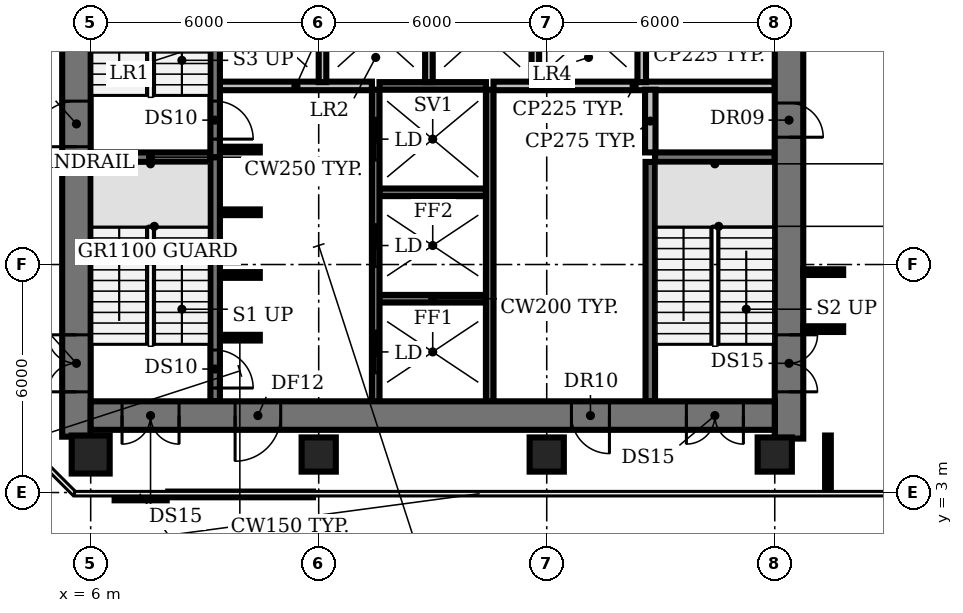
"""IFC4 building model, lengths in metres.
Left out: names, types, materials, properties, quantities, classifications, styles, units other than length and angle.
Written with IfcOpenShell. Run it as: python <this file> out.ifc"""

import sys

from ifc_helpers import new_model, si_unit, direction, frame, frame_2d, origin, origin_2d, place, context, subcontext, project, spatial, rectangle, circle, extrude, element, fill, save


model = new_model("IFC4")
c1 = context("Model", 3, precision=1e-05, world=origin(), true_north=direction((0.0, 1.0)))
c2 = subcontext(c1, "Body", "Model", "MODEL_VIEW")
j1 = project(units=[si_unit("LENGTHUNIT", "METRE"), si_unit("PLANEANGLEUNIT", "RADIAN")], contexts=[c1])
p1 = place(None, origin())
s1 = spatial("IfcSite", under=j1, at=p1, CompositionType="ELEMENT")
p2 = place(p1, origin())
s2 = spatial("IfcBuilding", under=s1, at=p2, CompositionType="ELEMENT")
p3 = place(p2, frame((0.0, 0.0, 92.0)))
s3 = spatial("IfcBuildingStorey", under=s2, at=p3, CompositionType="ELEMENT", Elevation=92.0)
p4 = place(p3, frame((6.0, 4.0, 0.0), z_axis=(0.0, 0.0, 1.0), x_axis=(1.0, 0.0, 0.0)))
e1 = element("IfcColumn", 1, at=p4, inside=s3, PredefinedType="COLUMN", context=c2, shape_type="SweptSolid", body=[
    extrude(circle(Radius=0.5, at=origin_2d()), origin(), (0.0, 0.0, 1.0), 3.85),
])
for number, where, z_axis, x_axis in (
    (2, (12.0, 4.0, 0.0), (0.0, 0.0, 1.0), (1.0, 0.0, 0.0)),
    (3, (18.0, 4.0, 0.0), (0.0, 0.0, 1.0), (1.0, 0.0, 0.0)),
    (4, (24.0, 4.0, 0.0), (0.0, 0.0, 1.0), (1.0, 0.0, 0.0)),
):
    element("IfcColumn", number, at=place(p3, frame(where, z_axis=z_axis, x_axis=x_axis)), inside=s3, PredefinedType="COLUMN", context=c2, shape_type="SweptSolid", body=[
        extrude(rectangle(XDim=0.9, YDim=0.9, at=origin_2d()), origin(), (0.0, 0.0, 1.0), 3.85),
    ])
p5 = place(p3, frame((9.4, 7.075, 0.0), z_axis=(0.0, 0.0, 1.0), x_axis=(1.0, 0.0, 0.0)))
e5 = element("IfcWall", 5, at=p5, inside=s3, PredefinedType="SHEAR", context=c2, shape_type="SweptSolid", body=[
    extrude(rectangle(XDim=1.05, YDim=0.15, at=frame_2d((0.525, 0.0))), origin(), (0.0, 0.0, 1.0), 3.85),
])
p6 = place(p3, frame((13.6, 8.1, 0.0), z_axis=(0.0, 0.0, 1.0), x_axis=(1.0, 0.0, 0.0)))
e6 = element("IfcWall", 6, at=p6, inside=s3, PredefinedType="SHEAR", context=c2, shape_type="SweptSolid", body=[
    extrude(rectangle(XDim=2.8, YDim=0.2, at=frame_2d((1.4, 0.0))), origin(), (0.0, 0.0, 1.0), 3.85),
])
for number, where, z_axis, x_axis in (
    (7, (9.4, 8.725, 0.0), (0.0, 0.0, 1.0), (1.0, 0.0, 0.0)),
    (8, (9.4, 10.375, 0.0), (0.0, 0.0, 1.0), (1.0, 0.0, 0.0)),
):
    element("IfcWall", number, at=place(p3, frame(where, z_axis=z_axis, x_axis=x_axis)), inside=s3, PredefinedType="SHEAR", context=c2, shape_type="SweptSolid", body=[
        extrude(rectangle(XDim=1.05, YDim=0.15, at=frame_2d((0.525, 0.0))), origin(), (0.0, 0.0, 1.0), 3.85),
    ])
p7 = place(p3, frame((13.6, 10.9, 0.0), z_axis=(0.0, 0.0, 1.0), x_axis=(1.0, 0.0, 0.0)))
e9 = element("IfcWall", 9, at=p7, inside=s3, PredefinedType="SHEAR", context=c2, shape_type="SweptSolid", body=[
    extrude(rectangle(XDim=2.8, YDim=0.2, at=frame_2d((1.4, 0.0))), origin(), (0.0, 0.0, 1.0), 3.85),
])
for number, where, z_axis, x_axis in (
    (10, (6.0, 11.825, 0.0), (0.0, 0.0, 1.0), (1.0, 0.0, 0.0)),
    (11, (20.85, 11.825, 0.0), (0.0, 0.0, 1.0), (1.0, 0.0, 0.0)),
):
    element("IfcWall", number, at=place(p3, frame(where, z_axis=z_axis, x_axis=x_axis)), inside=s3, PredefinedType="SHEAR", context=c2, shape_type="SweptSolid", body=[
        extrude(rectangle(XDim=3.15, YDim=0.25, at=frame_2d((1.575, 0.0))), origin(), (0.0, 0.0, 1.0), 3.85),
    ])
p8 = place(p3, frame((9.4, 12.025, 0.0), z_axis=(0.0, 0.0, 1.0), x_axis=(1.0, 0.0, 0.0)))
e12 = element("IfcWall", 12, at=p8, inside=s3, PredefinedType="SHEAR", context=c2, shape_type="SweptSolid", body=[
    extrude(rectangle(XDim=1.05, YDim=0.15, at=frame_2d((0.525, 0.0))), origin(), (0.0, 0.0, 1.0), 3.85),
])
p9 = place(p3, frame((9.4, 13.7, 0.0), z_axis=(0.0, 0.0, 1.0), x_axis=(1.0, 0.0, 0.0)))
e13 = element("IfcWall", 13, at=p9, inside=s3, PredefinedType="PARTITIONING", context=c2, shape_type="SweptSolid", body=[
    extrude(rectangle(XDim=4.0, YDim=0.225, at=frame_2d((2.0, 0.0))), origin(), (0.0, 0.0, 1.0), 3.85),
])
p10 = place(p3, frame((13.6, 13.7, 0.0), z_axis=(0.0, 0.0, 1.0), x_axis=(1.0, 0.0, 0.0)))
e14 = element("IfcWall", 14, at=p10, inside=s3, PredefinedType="SHEAR", context=c2, shape_type="SweptSolid", body=[
    extrude(rectangle(XDim=2.8, YDim=0.2, at=frame_2d((1.4, 0.0))), origin(), (0.0, 0.0, 1.0), 3.85),
])
p11 = place(p3, frame((16.6, 13.7, 0.0), z_axis=(0.0, 0.0, 1.0), x_axis=(1.0, 0.0, 0.0)))
e15 = element("IfcWall", 15, at=p11, inside=s3, PredefinedType="PARTITIONING", context=c2, shape_type="SweptSolid", body=[
    extrude(rectangle(XDim=7.4, YDim=0.225, at=frame_2d((3.7, 0.0))), origin(), (0.0, 0.0, 1.0), 3.85),
])
p12 = place(p3, frame((9.275, 11.825, 0.0), z_axis=(0.0, 0.0, 1.0), x_axis=(0.0, -1.0, 0.0)))
e16 = element("IfcWall", 16, at=p12, inside=s3, PredefinedType="SHEAR", context=c2, shape_type="SweptSolid", body=[
    extrude(rectangle(XDim=6.425, YDim=0.25, at=frame_2d((3.212, 0.0))), origin(), (0.0, 0.0, 1.0), 3.85),
])
p13 = place(p12, frame((5.075, 0.0, 0.0)))
e17 = element("IfcOpeningElement", 17, at=p13, cuts=e16, PredefinedType="OPENING", context=c2, shape_type="SweptSolid", body=[
    extrude(rectangle(XDim=1.0, YDim=2.1, at=frame_2d((0.5, 1.05))), frame((0.0, 0.135, 0.0), z_axis=(0.0, -1.0, 0.0), x_axis=(1.0, 0.0, 0.0)), (0.0, 0.0, 1.0), 0.27),
])
p14 = place(p3, frame((9.275, 18.375, 0.0), z_axis=(0.0, 0.0, 1.0), x_axis=(0.0, -1.0, 0.0)))
e18 = element("IfcWall", 18, at=p14, inside=s3, PredefinedType="SHEAR", context=c2, shape_type="SweptSolid", body=[
    extrude(rectangle(XDim=6.55, YDim=0.25, at=frame_2d((3.275, 0.0))), origin(), (0.0, 0.0, 1.0), 3.85),
])
p15 = place(p14, frame((5.075, 0.0, 0.0)))
e19 = element("IfcOpeningElement", 19, at=p15, cuts=e18, PredefinedType="OPENING", context=c2, shape_type="SweptSolid", body=[
    extrude(rectangle(XDim=1.0, YDim=2.1, at=frame_2d((0.5, 1.05))), frame((0.0, 0.135, 0.0), z_axis=(0.0, -1.0, 0.0), x_axis=(1.0, 0.0, 0.0)), (0.0, 0.0, 1.0), 0.27),
])
p16 = place(p3, frame((12.1, 13.8, 0.0), z_axis=(0.0, 0.0, 1.0), x_axis=(0.0, 1.0, 0.0)))
e20 = element("IfcWall", 20, at=p16, inside=s3, PredefinedType="SOLIDWALL", context=c2, shape_type="SweptSolid", body=[
    extrude(rectangle(XDim=2.6, YDim=0.2, at=frame_2d((1.3, 0.0))), origin(), (0.0, 0.0, 1.0), 3.85),
])
p17 = place(p3, frame((13.5, 5.4, 0.0), z_axis=(0.0, 0.0, 1.0), x_axis=(0.0, 1.0, 0.0)))
e21 = element("IfcWall", 21, at=p17, inside=s3, PredefinedType="SHEAR", context=c2, shape_type="SweptSolid", body=[
    extrude(rectangle(XDim=8.2, YDim=0.2, at=frame_2d((4.1, 0.0))), origin(), (0.0, 0.0, 1.0), 3.85),
])
p18 = place(p17, frame((0.75, 0.0, 0.0)))
e22 = element("IfcOpeningElement", 22, at=p18, cuts=e21, PredefinedType="OPENING", context=c2, shape_type="SweptSolid", body=[
    extrude(rectangle(XDim=1.1, YDim=2.1, at=frame_2d((0.55, 1.05))), frame((0.0, 0.11, 0.0), z_axis=(0.0, -1.0, 0.0), x_axis=(1.0, 0.0, 0.0)), (0.0, 0.0, 1.0), 0.22),
])
p19 = place(p17, frame((3.55, 0.0, 0.0)))
e23 = element("IfcOpeningElement", 23, at=p19, cuts=e21, PredefinedType="OPENING", context=c2, shape_type="SweptSolid", body=[
    extrude(rectangle(XDim=1.1, YDim=2.1, at=frame_2d((0.55, 1.05))), frame((0.0, 0.11, 0.0), z_axis=(0.0, -1.0, 0.0), x_axis=(1.0, 0.0, 0.0)), (0.0, 0.0, 1.0), 0.22),
])
p20 = place(p17, frame((6.35, 0.0, 0.0)))
e24 = element("IfcOpeningElement", 24, at=p20, cuts=e21, PredefinedType="OPENING", context=c2, shape_type="SweptSolid", body=[
    extrude(rectangle(XDim=1.1, YDim=2.1, at=frame_2d((0.55, 1.05))), frame((0.0, 0.11, 0.0), z_axis=(0.0, -1.0, 0.0), x_axis=(1.0, 0.0, 0.0)), (0.0, 0.0, 1.0), 0.22),
])
p21 = place(p3, frame((14.9, 13.8, 0.0), z_axis=(0.0, 0.0, 1.0), x_axis=(0.0, 1.0, 0.0)))
e25 = element("IfcWall", 25, at=p21, inside=s3, PredefinedType="SOLIDWALL", context=c2, shape_type="SweptSolid", body=[
    extrude(rectangle(XDim=2.6, YDim=0.2, at=frame_2d((1.3, 0.0))), origin(), (0.0, 0.0, 1.0), 3.85),
])
p22 = place(p3, frame((16.5, 5.4, 0.0), z_axis=(0.0, 0.0, 1.0), x_axis=(0.0, 1.0, 0.0)))
e26 = element("IfcWall", 26, at=p22, inside=s3, PredefinedType="SHEAR", context=c2, shape_type="SweptSolid", body=[
    extrude(rectangle(XDim=8.2, YDim=0.2, at=frame_2d((4.1, 0.0))), origin(), (0.0, 0.0, 1.0), 3.85),
])
p23 = place(p3, frame((17.7, 13.8, 0.0), z_axis=(0.0, 0.0, 1.0), x_axis=(0.0, 1.0, 0.0)))
e27 = element("IfcWall", 27, at=p23, inside=s3, PredefinedType="SOLIDWALL", context=c2, shape_type="SweptSolid", body=[
    extrude(rectangle(XDim=2.6, YDim=0.2, at=frame_2d((1.3, 0.0))), origin(), (0.0, 0.0, 1.0), 3.85),
])
p24 = place(p3, frame((20.5, 13.8, 0.0), z_axis=(0.0, 0.0, 1.0), x_axis=(0.0, 1.0, 0.0)))
e28 = element("IfcWall", 28, at=p24, inside=s3, PredefinedType="PARTITIONING", context=c2, shape_type="SweptSolid", body=[
    extrude(rectangle(XDim=2.6, YDim=0.225, at=frame_2d((1.3, 0.0))), origin(), (0.0, 0.0, 1.0), 3.85),
])
p25 = place(p3, frame((20.725, 5.4, 0.0), z_axis=(0.0, 0.0, 1.0), x_axis=(0.0, 1.0, 0.0)))
e29 = element("IfcWall", 29, at=p25, inside=s3, PredefinedType="SHEAR", context=c2, shape_type="SweptSolid", body=[
    extrude(rectangle(XDim=6.3, YDim=0.25, at=frame_2d((3.15, 0.0))), origin(), (0.0, 0.0, 1.0), 3.85),
])
p26 = place(p3, frame((20.725, 11.95, 0.0), z_axis=(0.0, 0.0, 1.0), x_axis=(0.0, 1.0, 0.0)))
e30 = element("IfcWall", 30, at=p26, inside=s3, PredefinedType="PARTITIONING", context=c2, shape_type="SweptSolid", body=[
    extrude(rectangle(XDim=1.65, YDim=0.275, at=frame_2d((0.825, 0.0))), origin(), (0.0, 0.0, 1.0), 3.85),
])
p27 = place(p3, frame((5.625, 4.47, 0.0), z_axis=(0.0, 0.0, 1.0), x_axis=(0.0, 1.0, 0.0)))
e31 = element("IfcWall", 31, at=p27, inside=s3, PredefinedType="SHEAR", context=c2, shape_type="SweptSolid", body=[
    extrude(rectangle(XDim=21.08, YDim=0.75, at=frame_2d((10.54, 0.0))), origin(), (0.0, 0.0, 1.0), 3.85),
])
p28 = place(p27, frame((1.18, 0.0, 0.0)))
e32 = element("IfcOpeningElement", 32, at=p28, cuts=e31, PredefinedType="OPENING", context=c2, shape_type="SweptSolid", body=[
    extrude(rectangle(XDim=1.5, YDim=2.1, at=frame_2d((0.75, 1.05))), frame((0.0, 0.385, 0.0), z_axis=(0.0, -1.0, 0.0), x_axis=(1.0, 0.0, 0.0)), (0.0, 0.0, 1.0), 0.77),
])
p29 = place(p27, frame((7.63, 0.0, 0.0)))
e33 = element("IfcOpeningElement", 33, at=p29, cuts=e31, PredefinedType="OPENING", context=c2, shape_type="SweptSolid", body=[
    extrude(rectangle(XDim=1.2, YDim=2.1, at=frame_2d((0.6, 1.05))), frame((0.0, 0.385, 0.0), z_axis=(0.0, -1.0, 0.0), x_axis=(1.0, 0.0, 0.0)), (0.0, 0.0, 1.0), 0.77),
])
p30 = place(p27, frame((14.18, 0.0, 0.0)))
e34 = element("IfcOpeningElement", 34, at=p30, cuts=e31, PredefinedType="OPENING", context=c2, shape_type="SweptSolid", body=[
    extrude(rectangle(XDim=1.2, YDim=2.1, at=frame_2d((0.6, 1.05))), frame((0.0, 0.385, 0.0), z_axis=(0.0, -1.0, 0.0), x_axis=(1.0, 0.0, 0.0)), (0.0, 0.0, 1.0), 0.77),
])
p31 = place(p3, frame((24.375, 25.55, 0.0), z_axis=(0.0, 0.0, 1.0), x_axis=(0.0, -1.0, 0.0)))
e35 = element("IfcWall", 35, at=p31, inside=s3, PredefinedType="SHEAR", context=c2, shape_type="SweptSolid", body=[
    extrude(rectangle(XDim=21.13, YDim=0.75, at=frame_2d((10.565, 0.0))), origin(), (0.0, 0.0, 1.0), 3.85),
])
p32 = place(p31, frame((18.4, 0.0, 0.0)))
e36 = element("IfcOpeningElement", 36, at=p32, cuts=e35, PredefinedType="OPENING", context=c2, shape_type="SweptSolid", body=[
    extrude(rectangle(XDim=1.5, YDim=2.1, at=frame_2d((0.75, 1.05))), frame((0.0, 0.385, 0.0), z_axis=(0.0, -1.0, 0.0), x_axis=(1.0, 0.0, 0.0)), (0.0, 0.0, 1.0), 0.77),
])
p33 = place(p31, frame((12.3, 0.0, 0.0)))
e37 = element("IfcOpeningElement", 37, at=p33, cuts=e35, PredefinedType="OPENING", context=c2, shape_type="SweptSolid", body=[
    extrude(rectangle(XDim=0.9, YDim=2.1, at=frame_2d((0.45, 1.05))), frame((0.0, 0.385, 0.0), z_axis=(0.0, -1.0, 0.0), x_axis=(1.0, 0.0, 0.0)), (0.0, 0.0, 1.0), 0.77),
])
p34 = place(p31, frame((6.3, 0.0, 0.0)))
e38 = element("IfcOpeningElement", 38, at=p34, cuts=e35, PredefinedType="OPENING", context=c2, shape_type="SweptSolid", body=[
    extrude(rectangle(XDim=2.0, YDim=2.1, at=frame_2d((1.0, 1.05))), frame((0.0, 0.385, 0.0), z_axis=(0.0, -1.0, 0.0), x_axis=(1.0, 0.0, 0.0)), (0.0, 0.0, 1.0), 0.77),
])
p35 = place(p3, frame((24.0, 5.025, 0.0), z_axis=(0.0, 0.0, 1.0), x_axis=(-1.0, 0.0, 0.0)))
e39 = element("IfcWall", 39, at=p35, inside=s3, PredefinedType="SHEAR", context=c2, shape_type="SweptSolid", body=[
    extrude(rectangle(XDim=18.0, YDim=0.75, at=frame_2d((9.0, 0.0))), origin(), (0.0, 0.0, 1.0), 3.85),
])
p36 = place(p35, frame((0.825, 0.0, 0.0)))
e40 = element("IfcOpeningElement", 40, at=p36, cuts=e39, PredefinedType="OPENING", context=c2, shape_type="SweptSolid", body=[
    extrude(rectangle(XDim=1.5, YDim=2.1, at=frame_2d((0.75, 1.05))), frame((0.0, 0.385, 0.0), z_axis=(0.0, -1.0, 0.0), x_axis=(1.0, 0.0, 0.0)), (0.0, 0.0, 1.0), 0.77),
])
p37 = place(p35, frame((15.675, 0.0, 0.0)))
e41 = element("IfcOpeningElement", 41, at=p37, cuts=e39, PredefinedType="OPENING", context=c2, shape_type="SweptSolid", body=[
    extrude(rectangle(XDim=1.5, YDim=2.1, at=frame_2d((0.75, 1.05))), frame((0.0, 0.385, 0.0), z_axis=(0.0, -1.0, 0.0), x_axis=(1.0, 0.0, 0.0)), (0.0, 0.0, 1.0), 0.77),
])
p38 = place(p35, frame((13.0, 0.0, 0.0)))
e42 = element("IfcOpeningElement", 42, at=p38, cuts=e39, PredefinedType="OPENING", context=c2, shape_type="SweptSolid", body=[
    extrude(rectangle(XDim=1.2, YDim=2.1, at=frame_2d((0.6, 1.05))), frame((0.0, 0.385, 0.0), z_axis=(0.0, -1.0, 0.0), x_axis=(1.0, 0.0, 0.0)), (0.0, 0.0, 1.0), 0.77),
])
p39 = place(p35, frame((4.35, 0.0, 0.0)))
e43 = element("IfcOpeningElement", 43, at=p39, cuts=e39, PredefinedType="OPENING", context=c2, shape_type="SweptSolid", body=[
    extrude(rectangle(XDim=1.0, YDim=2.1, at=frame_2d((0.5, 1.05))), frame((0.0, 0.385, 0.0), z_axis=(0.0, -1.0, 0.0), x_axis=(1.0, 0.0, 0.0)), (0.0, 0.0, 1.0), 0.77),
])
p40 = place(p3, frame((6.63, 2.87, 0.0), z_axis=(0.0, 0.0, 1.0), x_axis=(1.0, 0.0, 0.0)))
e44 = element("IfcWall", 44, at=p40, inside=s3, PredefinedType="PARTITIONING", context=c2, shape_type="SweptSolid", body=[
    extrude(rectangle(XDim=1.37, YDim=0.15, at=frame_2d((0.685, 0.0))), origin(), (0.0, 0.0, 1.0), 2.83),
])
p41 = place(p3, frame((8.04, 2.95, 0.0), z_axis=(0.0, 0.0, 1.0), x_axis=(1.0, 0.0, 0.0)))
e45 = element("IfcWall", 45, at=p41, inside=s3, PredefinedType="PARTITIONING", context=c2, shape_type="SweptSolid", body=[
    extrude(rectangle(XDim=3.81, YDim=0.15, at=frame_2d((1.905, 0.0))), origin(), (0.0, 0.0, 1.0), 2.83),
])
for number, where, z_axis, x_axis in (
    (46, (24.75, 7.3, 0.0), (0.0, 0.0, 1.0), (1.0, 0.0, 0.0)),
    (47, (24.75, 8.8, 0.0), (0.0, 0.0, 1.0), (1.0, 0.0, 0.0)),
):
    element("IfcWall", number, at=place(p3, frame(where, z_axis=z_axis, x_axis=x_axis)), inside=s3, PredefinedType="PARTITIONING", context=c2, shape_type="SweptSolid", body=[
        extrude(rectangle(XDim=1.05, YDim=0.15, at=frame_2d((0.525, 0.0))), origin(), (0.0, 0.0, 1.0), 2.83),
    ])
p42 = place(p3, frame((25.4, 3.02, 0.0), z_axis=(0.0, 0.0, 1.0), x_axis=(0.0, 1.0, 0.0)))
e48 = element("IfcWall", 48, at=p42, inside=s3, PredefinedType="PARTITIONING", context=c2, shape_type="SweptSolid", body=[
    extrude(rectangle(XDim=1.48, YDim=0.15, at=frame_2d((0.74, 0.0))), origin(), (0.0, 0.0, 1.0), 2.83),
])
p43 = place(p13, origin())
e49 = element("IfcDoor", 49, at=p43, inside=s3, OperationType="SINGLE_SWING_RIGHT", PredefinedType="DOOR", context=c2, shape_type="SweptSolid", body=[
    extrude(rectangle(XDim=1.0, YDim=2.1, at=frame_2d((0.5, 1.05))), frame((0.0, 0.025, 0.0), z_axis=(0.0, -1.0, 0.0), x_axis=(1.0, 0.0, 0.0)), (0.0, 0.0, 1.0), 0.05),
])
fill(e17, e49)
p44 = place(p15, origin())
e50 = element("IfcDoor", 50, at=p44, inside=s3, OperationType="SINGLE_SWING_RIGHT", PredefinedType="DOOR", context=c2, shape_type="SweptSolid", body=[
    extrude(rectangle(XDim=1.0, YDim=2.1, at=frame_2d((0.5, 1.05))), frame((0.0, 0.025, 0.0), z_axis=(0.0, -1.0, 0.0), x_axis=(1.0, 0.0, 0.0)), (0.0, 0.0, 1.0), 0.05),
])
fill(e19, e50)
p45 = place(p18, origin())
e51 = element("IfcDoor", 51, at=p45, inside=s3, OperationType="DOUBLE_DOOR_SLIDING", PredefinedType="DOOR", context=c2, shape_type="SweptSolid", body=[
    extrude(rectangle(XDim=1.1, YDim=2.1, at=frame_2d((0.55, 1.05))), frame((0.0, 0.025, 0.0), z_axis=(0.0, -1.0, 0.0), x_axis=(1.0, 0.0, 0.0)), (0.0, 0.0, 1.0), 0.05),
])
fill(e22, e51)
p46 = place(p19, origin())
e52 = element("IfcDoor", 52, at=p46, inside=s3, OperationType="DOUBLE_DOOR_SLIDING", PredefinedType="DOOR", context=c2, shape_type="SweptSolid", body=[
    extrude(rectangle(XDim=1.1, YDim=2.1, at=frame_2d((0.55, 1.05))), frame((0.0, 0.025, 0.0), z_axis=(0.0, -1.0, 0.0), x_axis=(1.0, 0.0, 0.0)), (0.0, 0.0, 1.0), 0.05),
])
fill(e23, e52)
p47 = place(p20, origin())
e53 = element("IfcDoor", 53, at=p47, inside=s3, OperationType="DOUBLE_DOOR_SLIDING", PredefinedType="DOOR", context=c2, shape_type="SweptSolid", body=[
    extrude(rectangle(XDim=1.1, YDim=2.1, at=frame_2d((0.55, 1.05))), frame((0.0, 0.025, 0.0), z_axis=(0.0, -1.0, 0.0), x_axis=(1.0, 0.0, 0.0)), (0.0, 0.0, 1.0), 0.05),
])
fill(e24, e53)
p48 = place(p28, origin())
e54 = element("IfcDoor", 54, at=p48, inside=s3, OperationType="DOUBLE_DOOR_SINGLE_SWING", PredefinedType="DOOR", context=c2, shape_type="SweptSolid", body=[
    extrude(rectangle(XDim=1.5, YDim=2.1, at=frame_2d((0.75, 1.05))), frame((0.0, 0.025, 0.0), z_axis=(0.0, -1.0, 0.0), x_axis=(1.0, 0.0, 0.0)), (0.0, 0.0, 1.0), 0.05),
])
fill(e32, e54)
p49 = place(p29, origin())
e55 = element("IfcDoor", 55, at=p49, inside=s3, OperationType="SINGLE_SWING_LEFT", PredefinedType="DOOR", context=c2, shape_type="SweptSolid", body=[
    extrude(rectangle(XDim=1.2, YDim=2.1, at=frame_2d((0.6, 1.05))), frame((0.0, 0.025, 0.0), z_axis=(0.0, -1.0, 0.0), x_axis=(1.0, 0.0, 0.0)), (0.0, 0.0, 1.0), 0.05),
])
fill(e33, e55)
p50 = place(p32, origin())
e56 = element("IfcDoor", 56, at=p50, inside=s3, OperationType="DOUBLE_DOOR_SINGLE_SWING", PredefinedType="DOOR", context=c2, shape_type="SweptSolid", body=[
    extrude(rectangle(XDim=1.5, YDim=2.1, at=frame_2d((0.75, 1.05))), frame((0.0, 0.025, 0.0), z_axis=(0.0, -1.0, 0.0), x_axis=(1.0, 0.0, 0.0)), (0.0, 0.0, 1.0), 0.05),
])
fill(e36, e56)
p51 = place(p33, origin())
e57 = element("IfcDoor", 57, at=p51, inside=s3, OperationType="SINGLE_SWING_RIGHT", PredefinedType="DOOR", context=c2, shape_type="SweptSolid", body=[
    extrude(rectangle(XDim=0.9, YDim=2.1, at=frame_2d((0.45, 1.05))), frame((0.0, -0.315, 0.0), z_axis=(0.0, -1.0, 0.0), x_axis=(1.0, 0.0, 0.0)), (0.0, 0.0, 1.0), 0.05),
])
fill(e37, e57)
p52 = place(p36, origin())
e58 = element("IfcDoor", 58, at=p52, inside=s3, OperationType="DOUBLE_DOOR_SINGLE_SWING", PredefinedType="DOOR", context=c2, shape_type="SweptSolid", body=[
    extrude(rectangle(XDim=1.5, YDim=2.1, at=frame_2d((0.75, 1.05))), frame((0.0, 0.025, 0.0), z_axis=(0.0, -1.0, 0.0), x_axis=(1.0, 0.0, 0.0)), (0.0, 0.0, 1.0), 0.05),
])
fill(e40, e58)
p53 = place(p37, origin())
e59 = element("IfcDoor", 59, at=p53, inside=s3, OperationType="DOUBLE_DOOR_SINGLE_SWING", PredefinedType="DOOR", context=c2, shape_type="SweptSolid", body=[
    extrude(rectangle(XDim=1.5, YDim=2.1, at=frame_2d((0.75, 1.05))), frame((0.0, 0.025, 0.0), z_axis=(0.0, -1.0, 0.0), x_axis=(1.0, 0.0, 0.0)), (0.0, 0.0, 1.0), 0.05),
])
fill(e41, e59)
p54 = place(p38, origin())
e60 = element("IfcDoor", 60, at=p54, inside=s3, OperationType="SINGLE_SWING_RIGHT", PredefinedType="DOOR", context=c2, shape_type="SweptSolid", body=[
    extrude(rectangle(XDim=1.2, YDim=2.1, at=frame_2d((0.6, 1.05))), frame((0.0, 0.025, 0.0), z_axis=(0.0, -1.0, 0.0), x_axis=(1.0, 0.0, 0.0)), (0.0, 0.0, 1.0), 0.05),
])
fill(e42, e60)
p55 = place(p39, origin())
e61 = element("IfcDoor", 61, at=p55, inside=s3, OperationType="SINGLE_SWING_LEFT", PredefinedType="DOOR", context=c2, shape_type="SweptSolid", body=[
    extrude(rectangle(XDim=1.0, YDim=2.1, at=frame_2d((0.5, 1.05))), frame((0.0, -0.315, 0.0), z_axis=(0.0, -1.0, 0.0), x_axis=(1.0, 0.0, 0.0)), (0.0, 0.0, 1.0), 0.05),
])
fill(e43, e61)
save(model, sys.argv[1])
